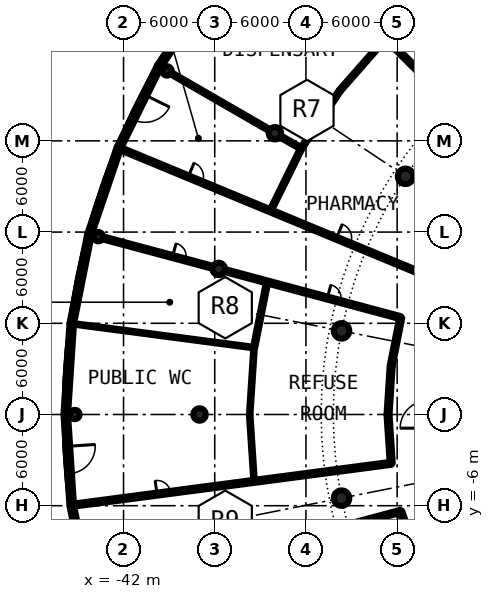
"""IFC4 building model, lengths in metres.
Left out: names, types, materials, properties, quantities, classifications, styles, units other than length and angle.
Written with IfcOpenShell. Run it as: python <this file> out.ifc"""

import sys

from ifc_helpers import new_model, si_unit, direction, frame, frame_2d, origin, origin_2d, place, context, subcontext, project, spatial, rectangle, hollow_circle, extrude, element, fill, save


model = new_model("IFC4")
c1 = context("Model", 3, precision=1e-05, world=origin(), true_north=direction((0.0, 1.0)))
c2 = subcontext(c1, "Body", "Model", "MODEL_VIEW")
j1 = project(units=[si_unit("LENGTHUNIT", "METRE"), si_unit("PLANEANGLEUNIT", "RADIAN")], contexts=[c1])
p1 = place(None, origin())
s1 = spatial("IfcSite", under=j1, at=p1, CompositionType="ELEMENT")
p2 = place(p1, origin())
s2 = spatial("IfcBuilding", under=s1, at=p2, CompositionType="ELEMENT")
p3 = place(p2, origin())
s3 = spatial("IfcBuildingStorey", under=s2, at=p3, CompositionType="ELEMENT", Elevation=0.0)
for number, where, z_axis, x_axis in (
    (1, (-23.448, 15.667, -0.5), (0.0, 0.0, 1.0), (1.0, 0.0, 0.0)),
    (2, (-27.658, 5.501, -0.5), (0.0, 0.0, 1.0), (1.0, 0.0, 0.0)),
    (3, (-27.658, -5.501, -0.5), (0.0, 0.0, 1.0), (1.0, 0.0, 0.0)),
):
    element("IfcColumn", number, at=place(p3, frame(where, z_axis=z_axis, x_axis=x_axis)), inside=s3, PredefinedType="COLUMN", context=c2, shape_type="SweptSolid", body=[
        extrude(hollow_circle(Radius=0.508, WallThickness=0.05, at=origin_2d()), origin(), (0.0, 0.0, 1.0), 5.9),
    ])
for number, where, z_axis, x_axis in (
    (4, (-32.043, 18.5, -0.5), (0.0, 0.0, 1.0), (1.0, 0.0, 0.0)),
    (5, (-35.739, 9.576, -0.5), (0.0, 0.0, 1.0), (1.0, 0.0, 0.0)),
    (6, (-37.0, 0.0, -0.5), (0.0, 0.0, 1.0), (1.0, 0.0, 0.0)),
):
    element("IfcColumn", number, at=place(p3, frame(where, z_axis=z_axis, x_axis=x_axis)), inside=s3, PredefinedType="COLUMN", context=c2, shape_type="SweptSolid", body=[
        extrude(hollow_circle(Radius=0.406, WallThickness=0.03, at=origin_2d()), origin(), (0.0, 0.0, 1.0), 5.9),
    ])
for number, where, z_axis, x_axis in (
    (7, (-39.144, 22.6, -0.5), (0.0, 0.0, 1.0), (1.0, 0.0, 0.0)),
    (8, (-43.66, 11.698, -0.5), (0.0, 0.0, 1.0), (1.0, 0.0, 0.0)),
    (9, (-45.2, 0.0, -0.5), (0.0, 0.0, 1.0), (1.0, 0.0, 0.0)),
):
    element("IfcColumn", number, at=place(p3, frame(where, z_axis=z_axis, x_axis=x_axis)), inside=s3, PredefinedType="COLUMN", context=c2, shape_type="SweptSolid", body=[
        extrude(hollow_circle(Radius=0.305, WallThickness=0.025, at=origin_2d()), origin(), (0.0, 0.0, 1.0), 5.9),
    ])
p4 = place(p3, frame((-36.336, 27.881, 0.0), z_axis=(0.0, 0.0, 1.0), x_axis=(-0.55554631985, -0.831485590074, 0.0)))
e10 = element("IfcWall", 10, at=p4, inside=s3, PredefinedType="SOLIDWALL", context=c2, shape_type="SweptSolid", body=[
    extrude(rectangle(XDim=5.991, YDim=0.3, at=frame_2d((2.995, 0.0))), origin(), (0.0, 0.0, 1.0), 4.95),
])
p5 = place(p4, frame((1.396, 0.0, 0.3)))
e11 = element("IfcOpeningElement", 11, at=p5, cuts=e10, PredefinedType="OPENING", context=c2, shape_type="SweptSolid", body=[
    extrude(rectangle(XDim=3.2, YDim=3.6, at=frame_2d((1.6, 1.8))), frame((0.0, 0.16, 0.0), z_axis=(0.0, -1.0, 0.0), x_axis=(1.0, 0.0, 0.0)), (0.0, 0.0, 1.0), 0.32),
])
p6 = place(p3, frame((-39.664, 22.9, 0.0), z_axis=(0.0, 0.0, 1.0), x_axis=(-0.44233289833, -0.896850939151, 0.0)))
e12 = element("IfcWall", 12, at=p6, inside=s3, PredefinedType="SOLIDWALL", context=c2, shape_type="SweptSolid", body=[
    extrude(rectangle(XDim=5.991, YDim=0.3, at=frame_2d((2.995, 0.0))), origin(), (0.0, 0.0, 1.0), 4.95),
])
p7 = place(p6, frame((2.095, 0.0, 0.0)))
e13 = element("IfcOpeningElement", 13, at=p7, cuts=e12, PredefinedType="OPENING", context=c2, shape_type="SweptSolid", body=[
    extrude(rectangle(XDim=1.8, YDim=2.2, at=frame_2d((0.9, 1.1))), frame((0.0, 0.16, 0.0), z_axis=(0.0, -1.0, 0.0), x_axis=(1.0, 0.0, 0.0)), (0.0, 0.0, 1.0), 0.32),
])
p8 = place(p3, frame((-42.314, 17.527, 0.0), z_axis=(0.0, 0.0, 1.0), x_axis=(-0.321333542675, -0.946966078776, 0.0)))
e14 = element("IfcWall", 14, at=p8, inside=s3, PredefinedType="SOLIDWALL", context=c2, shape_type="SweptSolid", body=[
    extrude(rectangle(XDim=5.991, YDim=0.3, at=frame_2d((2.995, 0.0))), origin(), (0.0, 0.0, 1.0), 4.95),
])
p9 = place(p8, frame((1.396, 0.0, 0.3)))
e15 = element("IfcOpeningElement", 15, at=p9, cuts=e14, PredefinedType="OPENING", context=c2, shape_type="SweptSolid", body=[
    extrude(rectangle(XDim=3.2, YDim=3.6, at=frame_2d((1.6, 1.8))), frame((0.0, 0.16, 0.0), z_axis=(0.0, -1.0, 0.0), x_axis=(1.0, 0.0, 0.0)), (0.0, 0.0, 1.0), 0.32),
])
p10 = place(p3, frame((-44.239, 11.854, 0.0), z_axis=(0.0, 0.0, 1.0), x_axis=(-0.195112945602, -0.980780780021, 0.0)))
e16 = element("IfcWall", 16, at=p10, inside=s3, PredefinedType="SOLIDWALL", context=c2, shape_type="SweptSolid", body=[
    extrude(rectangle(XDim=5.991, YDim=0.3, at=frame_2d((2.996, 0.0))), origin(), (0.0, 0.0, 1.0), 4.95),
])
p11 = place(p10, frame((1.396, 0.0, 0.3)))
e17 = element("IfcOpeningElement", 17, at=p11, cuts=e16, PredefinedType="OPENING", context=c2, shape_type="SweptSolid", body=[
    extrude(rectangle(XDim=3.2, YDim=3.6, at=frame_2d((1.6, 1.8))), frame((0.0, 0.16, 0.0), z_axis=(0.0, -1.0, 0.0), x_axis=(1.0, 0.0, 0.0)), (0.0, 0.0, 1.0), 0.32),
])
p12 = place(p3, frame((-45.408, 5.978, 0.0), z_axis=(0.0, 0.0, 1.0), x_axis=(-0.065447877106, -0.9978559893, 0.0)))
e18 = element("IfcWall", 18, at=p12, inside=s3, PredefinedType="SOLIDWALL", context=c2, shape_type="SweptSolid", body=[
    extrude(rectangle(XDim=5.991, YDim=0.3, at=frame_2d((2.996, 0.0))), origin(), (0.0, 0.0, 1.0), 4.95),
])
p13 = place(p12, frame((1.396, 0.0, 0.3)))
e19 = element("IfcOpeningElement", 19, at=p13, cuts=e18, PredefinedType="OPENING", context=c2, shape_type="SweptSolid", body=[
    extrude(rectangle(XDim=3.2, YDim=3.6, at=frame_2d((1.6, 1.8))), frame((0.0, 0.16, 0.0), z_axis=(0.0, -1.0, 0.0), x_axis=(1.0, 0.0, 0.0)), (0.0, 0.0, 1.0), 0.32),
])
p14 = place(p3, frame((-45.8, 0.0, 0.0), z_axis=(0.0, 0.0, 1.0), x_axis=(0.065447877106, -0.9978559893, 0.0)))
e20 = element("IfcWall", 20, at=p14, inside=s3, PredefinedType="SOLIDWALL", context=c2, shape_type="SweptSolid", body=[
    extrude(rectangle(XDim=5.991, YDim=0.3, at=frame_2d((2.996, 0.0))), origin(), (0.0, 0.0, 1.0), 4.95),
])
p15 = place(p14, frame((2.095, 0.0, 0.0)))
e21 = element("IfcOpeningElement", 21, at=p15, cuts=e20, PredefinedType="OPENING", context=c2, shape_type="SweptSolid", body=[
    extrude(rectangle(XDim=1.8, YDim=2.2, at=frame_2d((0.9, 1.1))), frame((0.0, 0.16, 0.0), z_axis=(0.0, -1.0, 0.0), x_axis=(1.0, 0.0, 0.0)), (0.0, 0.0, 1.0), 0.32),
])
p16 = place(p3, frame((-45.408, -5.978, 0.0), z_axis=(0.0, 0.0, 1.0), x_axis=(0.195112945602, -0.980780780021, 0.0)))
e22 = element("IfcWall", 22, at=p16, inside=s3, PredefinedType="SOLIDWALL", context=c2, shape_type="SweptSolid", body=[
    extrude(rectangle(XDim=5.991, YDim=0.3, at=frame_2d((2.996, 0.0))), origin(), (0.0, 0.0, 1.0), 4.95),
])
p17 = place(p16, frame((1.396, 0.0, 0.3)))
e23 = element("IfcOpeningElement", 23, at=p17, cuts=e22, PredefinedType="OPENING", context=c2, shape_type="SweptSolid", body=[
    extrude(rectangle(XDim=3.2, YDim=3.6, at=frame_2d((1.6, 1.8))), frame((0.0, 0.16, 0.0), z_axis=(0.0, -1.0, 0.0), x_axis=(1.0, 0.0, 0.0)), (0.0, 0.0, 1.0), 0.32),
])
p18 = place(p3, frame((-33.7, 0.0, 0.0), z_axis=(0.0, 0.0, 1.0), x_axis=(0.065294928673, -0.997866009186, 0.0)))
e24 = element("IfcWall", 24, at=p18, inside=s3, PredefinedType="PARTITIONING", context=c2, shape_type="SweptSolid", body=[
    extrude(rectangle(XDim=4.408, YDim=0.1, at=frame_2d((2.204, 0.0))), origin(), (0.0, 0.0, 1.0), 4.95),
])
p19 = place(p3, frame((-24.6, 0.0, 0.0), z_axis=(0.0, 0.0, 1.0), x_axis=(0.06532549509, -0.997864008616, 0.0)))
e25 = element("IfcWall", 25, at=p19, inside=s3, PredefinedType="PARTITIONING", context=c2, shape_type="SweptSolid", body=[
    extrude(rectangle(XDim=3.218, YDim=0.2, at=frame_2d((1.609, 0.0))), origin(), (0.0, 0.0, 1.0), 4.95),
])
p20 = place(p3, frame((-23.762, -6.367, 0.0), z_axis=(0.0, 0.0, 1.0), x_axis=(0.321593976879, -0.946877665823, 0.0)))
e26 = element("IfcWall", 26, at=p20, inside=s3, PredefinedType="PARTITIONING", context=c2, shape_type="SweptSolid", body=[
    extrude(rectangle(XDim=3.218, YDim=0.2, at=frame_2d((1.609, 0.0))), origin(), (0.0, 0.0, 1.0), 4.95),
])
p21 = place(p3, frame((-45.297, -5.963, 0.0), z_axis=(0.0, 0.0, 1.0), x_axis=(0.991454137917, 0.13045571052, 0.0)))
e27 = element("IfcWall", 27, at=p21, inside=s3, PredefinedType="PARTITIONING", context=c2, shape_type="SweptSolid", body=[
    extrude(rectangle(XDim=21.087, YDim=0.2, at=frame_2d((10.544, 0.0))), origin(), (0.0, 0.0, 1.0), 4.95),
])
p22 = place(p21, frame((5.544, 0.0, 0.0)))
e28 = element("IfcOpeningElement", 28, at=p22, cuts=e27, PredefinedType="OPENING", context=c2, shape_type="SweptSolid", body=[
    extrude(rectangle(XDim=0.9, YDim=2.3, at=frame_2d((0.45, 1.15))), frame((0.0, 0.11, 0.0), z_axis=(0.0, -1.0, 0.0), x_axis=(1.0, 0.0, 0.0)), (0.0, 0.0, 1.0), 0.22),
])
p23 = place(p3, frame((-45.297, 5.963, 0.0), z_axis=(0.0, 0.0, 1.0), x_axis=(0.991452701101, -0.130466629758, 0.0)))
e29 = element("IfcWall", 29, at=p23, inside=s3, PredefinedType="PARTITIONING", context=c2, shape_type="SweptSolid", body=[
    extrude(rectangle(XDim=11.988, YDim=0.1, at=frame_2d((5.994, 0.0))), origin(), (0.0, 0.0, 1.0), 4.95),
])
p24 = place(p3, frame((-43.37, 11.62, 0.0), z_axis=(0.0, 0.0, 1.0), x_axis=(0.965931198614, -0.25879899448, 0.0)))
e30 = element("IfcWall", 30, at=p24, inside=s3, PredefinedType="PARTITIONING", context=c2, shape_type="SweptSolid", body=[
    extrude(rectangle(XDim=7.501, YDim=0.2, at=frame_2d((3.75, 0.0))), origin(), (0.0, 0.0, 1.0), 4.95),
])
p25 = place(p24, frame((4.756, 0.0, 0.0)))
e31 = element("IfcOpeningElement", 31, at=p25, cuts=e30, PredefinedType="OPENING", context=c2, shape_type="SweptSolid", body=[
    extrude(rectangle(XDim=0.9, YDim=2.3, at=frame_2d((0.45, 1.15))), frame((0.0, 0.11, 0.0), z_axis=(0.0, -1.0, 0.0), x_axis=(1.0, 0.0, 0.0)), (0.0, 0.0, 1.0), 0.22),
])
p26 = place(p3, frame((-42.221, 17.489, 0.0), z_axis=(0.0, 0.0, 1.0), x_axis=(0.923857892323, -0.382735672225, 0.0)))
e32 = element("IfcWall", 32, at=p26, inside=s3, PredefinedType="PARTITIONING", context=c2, shape_type="SweptSolid", body=[
    extrude(rectangle(XDim=21.101, YDim=0.2, at=frame_2d((10.55, 0.0))), origin(), (0.0, 0.0, 1.0), 4.95),
])
p27 = place(p26, frame((15.4, 0.0, 0.0)))
e33 = element("IfcOpeningElement", 33, at=p27, cuts=e32, PredefinedType="OPENING", context=c2, shape_type="SweptSolid", body=[
    extrude(rectangle(XDim=1.0, YDim=2.3, at=frame_2d((0.5, 1.15))), frame((0.0, 0.11, 0.0), z_axis=(0.0, -1.0, 0.0), x_axis=(1.0, 0.0, 0.0)), (0.0, 0.0, 1.0), 0.22),
])
p28 = place(p26, frame((4.85, 0.0, 0.0)))
e34 = element("IfcOpeningElement", 34, at=p28, cuts=e32, PredefinedType="OPENING", context=c2, shape_type="SweptSolid", body=[
    extrude(rectangle(XDim=1.0, YDim=2.3, at=frame_2d((0.5, 1.15))), frame((0.0, 0.11, 0.0), z_axis=(0.0, -1.0, 0.0), x_axis=(1.0, 0.0, 0.0)), (0.0, 0.0, 1.0), 0.22),
])
p29 = place(p3, frame((-38.885, 22.45, 0.0), z_axis=(0.0, 0.0, 1.0), x_axis=(0.866055506462, -0.499947857008, 0.0)))
e35 = element("IfcWall", 35, at=p29, inside=s3, PredefinedType="PARTITIONING", context=c2, shape_type="SweptSolid", body=[
    extrude(rectangle(XDim=7.501, YDim=0.15, at=frame_2d((3.75, 0.0))), origin(), (0.0, 0.0, 1.0), 4.95),
])
p30 = place(p3, frame((-35.354, 9.472, 0.0), z_axis=(0.0, 0.0, 1.0), x_axis=(0.965928346829, -0.258809638136, 0.0)))
e36 = element("IfcWall", 36, at=p30, inside=s3, PredefinedType="PARTITIONING", context=c2, shape_type="SweptSolid", body=[
    extrude(rectangle(XDim=12.001, YDim=0.2, at=frame_2d((6.0, 0.0))), origin(), (0.0, 0.0, 1.0), 4.95),
])
p31 = place(p30, frame((7.001, 0.0, 0.0)))
e37 = element("IfcOpeningElement", 37, at=p31, cuts=e36, PredefinedType="OPENING", context=c2, shape_type="SweptSolid", body=[
    extrude(rectangle(XDim=0.9, YDim=2.3, at=frame_2d((0.45, 1.15))), frame((0.0, 0.11, 0.0), z_axis=(0.0, -1.0, 0.0), x_axis=(1.0, 0.0, 0.0)), (0.0, 0.0, 1.0), 0.22),
])
p32 = place(p3, frame((-35.353, -9.472, 0.0), z_axis=(0.0, 0.0, 1.0), x_axis=(0.965943238878, 0.258754051689, 0.0)))
e38 = element("IfcWall", 38, at=p32, inside=s3, PredefinedType="PARTITIONING", context=c2, shape_type="SweptSolid", body=[
    extrude(rectangle(XDim=12.0, YDim=0.2, at=frame_2d((6.0, 0.0))), origin(), (0.0, 0.0, 1.0), 4.95),
])
p33 = place(p3, frame((-31.697, 18.3, 0.0), z_axis=(0.0, 0.0, 1.0), x_axis=(0.866066190972, -0.499929347863, 0.0)))
e39 = element("IfcWall", 39, at=p33, inside=s3, PredefinedType="PARTITIONING", context=c2, shape_type="SweptSolid", body=[
    extrude(rectangle(XDim=1.6, YDim=0.15, at=frame_2d((0.8, 0.0))), origin(), (0.0, 0.0, 1.0), 4.95),
])
p34 = place(p3, frame((-27.813, 36.247, 0.0), z_axis=(0.0, 0.0, 1.0), x_axis=(0.608725588574, -0.793380840338, 0.0)))
e40 = element("IfcWall", 40, at=p34, inside=s3, PredefinedType="PARTITIONING", context=c2, shape_type="SweptSolid", body=[
    extrude(rectangle(XDim=21.088, YDim=0.2, at=frame_2d((10.544, 0.0))), origin(), (0.0, 0.0, 1.0), 4.95),
])
p35 = place(p34, frame((16.738, 0.0, 0.0)))
e41 = element("IfcOpeningElement", 41, at=p35, cuts=e40, PredefinedType="OPENING", context=c2, shape_type="SweptSolid", body=[
    extrude(rectangle(XDim=1.0, YDim=2.3, at=frame_2d((0.5, 1.15))), frame((0.0, 0.11, 0.0), z_axis=(0.0, -1.0, 0.0), x_axis=(1.0, 0.0, 0.0)), (0.0, 0.0, 1.0), 0.22),
])
p36 = place(p34, frame((6.194, 0.0, 0.0)))
e42 = element("IfcOpeningElement", 42, at=p36, cuts=e40, PredefinedType="OPENING", context=c2, shape_type="SweptSolid", body=[
    extrude(rectangle(XDim=1.0, YDim=2.3, at=frame_2d((0.5, 1.15))), frame((0.0, 0.11, 0.0), z_axis=(0.0, -1.0, 0.0), x_axis=(1.0, 0.0, 0.0)), (0.0, 0.0, 1.0), 0.22),
])
p37 = place(p3, frame((-25.876, 25.876, 0.0), z_axis=(0.0, 0.0, 1.0), x_axis=(0.707106781187, -0.707106781187, 0.0)))
e43 = element("IfcWall", 43, at=p37, inside=s3, PredefinedType="PARTITIONING", context=c2, shape_type="SweptSolid", body=[
    extrude(rectangle(XDim=11.994, YDim=0.2, at=frame_2d((5.997, 0.0))), origin(), (0.0, 0.0, 1.0), 4.95),
])
for number, where, z_axis, x_axis in (
    (44, (-24.6, 0.0, 0.0), (0.0, 0.0, 1.0), (0.065, 0.998, 0.0)),
    (45, (-24.39, 3.211, 0.0), (0.0, 0.0, 1.0), (0.195, 0.981, 0.0)),
):
    element("IfcWall", number, at=place(p3, frame(where, z_axis=z_axis, x_axis=x_axis)), inside=s3, PredefinedType="PARTITIONING", context=c2, shape_type="SweptSolid", body=[
        extrude(rectangle(XDim=3.218, YDim=0.2, at=frame_2d((1.609, 0.0))), origin(), (0.0, 0.0, 1.0), 4.95),
    ])
p38 = place(p3, frame((-33.7, 0.0, 0.0), z_axis=(0.0, 0.0, 1.0), x_axis=(0.065294928673, 0.997866009186, 0.0)))
e46 = element("IfcWall", 46, at=p38, inside=s3, PredefinedType="PARTITIONING", context=c2, shape_type="SweptSolid", body=[
    extrude(rectangle(XDim=4.408, YDim=0.1, at=frame_2d((2.204, 0.0))), origin(), (0.0, 0.0, 1.0), 4.95),
])
p39 = place(p3, frame((-33.412, 4.399, 0.0), z_axis=(0.0, 0.0, 1.0), x_axis=(0.19513607482, 0.980776178495, 0.0)))
e47 = element("IfcWall", 47, at=p39, inside=s3, PredefinedType="PARTITIONING", context=c2, shape_type="SweptSolid", body=[
    extrude(rectangle(XDim=4.408, YDim=0.15, at=frame_2d((2.204, 0.0))), origin(), (0.0, 0.0, 1.0), 4.95),
])
p40 = place(p3, frame((-32.336, 13.394, 0.0), z_axis=(0.0, 0.0, 1.0), x_axis=(0.442300710668, 0.896866813603, 0.0)))
e48 = element("IfcWall", 48, at=p40, inside=s3, PredefinedType="PARTITIONING", context=c2, shape_type="SweptSolid", body=[
    extrude(rectangle(XDim=4.578, YDim=0.15, at=frame_2d((2.289, 0.0))), origin(), (0.0, 0.0, 1.0), 4.95),
])
p41 = place(p3, frame((-30.311, 17.5, 0.0), z_axis=(0.0, 0.0, 1.0), x_axis=(0.555610431873, 0.831442750882, 0.0)))
e49 = element("IfcWall", 49, at=p41, inside=s3, PredefinedType="PARTITIONING", context=c2, shape_type="SweptSolid", body=[
    extrude(rectangle(XDim=4.579, YDim=0.15, at=frame_2d((2.289, 0.0))), origin(), (0.0, 0.0, 1.0), 4.95),
])
p42 = place(p3, frame((-27.767, 21.307, 0.0), z_axis=(0.0, 0.0, 1.0), x_axis=(0.659270714245, 0.751905662526, 0.0)))
e50 = element("IfcWall", 50, at=p42, inside=s3, PredefinedType="PARTITIONING", context=c2, shape_type="SweptSolid", body=[
    extrude(rectangle(XDim=4.578, YDim=0.15, at=frame_2d((2.289, 0.0))), origin(), (0.0, 0.0, 1.0), 4.95),
])
p43 = place(p7, origin())
e51 = element("IfcDoor", 51, at=p43, inside=s3, OperationType="SINGLE_SWING_LEFT", PredefinedType="DOOR", context=c2, shape_type="SweptSolid", body=[
    extrude(rectangle(XDim=1.8, YDim=2.2, at=frame_2d((0.9, 1.1))), frame((0.0, 0.025, 0.0), z_axis=(0.0, -1.0, 0.0), x_axis=(1.0, 0.0, 0.0)), (0.0, 0.0, 1.0), 0.05),
])
fill(e13, e51)
p44 = place(p9, origin())
e52 = element("IfcWindow", 52, at=p44, inside=s3, PartitioningType="SINGLE_PANEL", PredefinedType="WINDOW", context=c2, shape_type="SweptSolid", body=[
    extrude(rectangle(XDim=3.2, YDim=3.6, at=frame_2d((1.6, 1.8))), frame((0.0, 0.03, 0.0), z_axis=(0.0, -1.0, 0.0), x_axis=(1.0, 0.0, 0.0)), (0.0, 0.0, 1.0), 0.06),
])
fill(e15, e52)
p45 = place(p11, origin())
e53 = element("IfcWindow", 53, at=p45, inside=s3, PartitioningType="SINGLE_PANEL", PredefinedType="WINDOW", context=c2, shape_type="SweptSolid", body=[
    extrude(rectangle(XDim=3.2, YDim=3.6, at=frame_2d((1.6, 1.8))), frame((0.0, 0.03, 0.0), z_axis=(0.0, -1.0, 0.0), x_axis=(1.0, 0.0, 0.0)), (0.0, 0.0, 1.0), 0.06),
])
fill(e17, e53)
p46 = place(p13, origin())
e54 = element("IfcWindow", 54, at=p46, inside=s3, PartitioningType="SINGLE_PANEL", PredefinedType="WINDOW", context=c2, shape_type="SweptSolid", body=[
    extrude(rectangle(XDim=3.2, YDim=3.6, at=frame_2d((1.6, 1.8))), frame((0.0, 0.03, 0.0), z_axis=(0.0, -1.0, 0.0), x_axis=(1.0, 0.0, 0.0)), (0.0, 0.0, 1.0), 0.06),
])
fill(e19, e54)
p47 = place(p15, origin())
e55 = element("IfcDoor", 55, at=p47, inside=s3, OperationType="SINGLE_SWING_LEFT", PredefinedType="DOOR", context=c2, shape_type="SweptSolid", body=[
    extrude(rectangle(XDim=1.8, YDim=2.2, at=frame_2d((0.9, 1.1))), frame((0.0, 0.025, 0.0), z_axis=(0.0, -1.0, 0.0), x_axis=(1.0, 0.0, 0.0)), (0.0, 0.0, 1.0), 0.05),
])
fill(e21, e55)
p48 = place(p27, origin())
e56 = element("IfcDoor", 56, at=p48, inside=s3, OperationType="SINGLE_SWING_RIGHT", PredefinedType="DOOR", context=c2, shape_type="SweptSolid", body=[
    extrude(rectangle(XDim=1.0, YDim=2.3, at=frame_2d((0.5, 1.15))), frame((0.0, 0.025, 0.0), z_axis=(0.0, -1.0, 0.0), x_axis=(1.0, 0.0, 0.0)), (0.0, 0.0, 1.0), 0.05),
])
fill(e33, e56)
p49 = place(p28, origin())
e57 = element("IfcDoor", 57, at=p49, inside=s3, OperationType="SINGLE_SWING_LEFT", PredefinedType="DOOR", context=c2, shape_type="SweptSolid", body=[
    extrude(rectangle(XDim=1.0, YDim=2.3, at=frame_2d((0.5, 1.15))), frame((0.0, 0.025, 0.0), z_axis=(0.0, -1.0, 0.0), x_axis=(1.0, 0.0, 0.0)), (0.0, 0.0, 1.0), 0.05),
])
fill(e34, e57)
p50 = place(p31, origin())
e58 = element("IfcDoor", 58, at=p50, inside=s3, OperationType="SINGLE_SWING_RIGHT", PredefinedType="DOOR", context=c2, shape_type="SweptSolid", body=[
    extrude(rectangle(XDim=0.9, YDim=2.3, at=frame_2d((0.45, 1.15))), frame((0.0, 0.025, 0.0), z_axis=(0.0, -1.0, 0.0), x_axis=(1.0, 0.0, 0.0)), (0.0, 0.0, 1.0), 0.05),
])
fill(e37, e58)
p51 = place(p25, origin())
e59 = element("IfcDoor", 59, at=p51, inside=s3, OperationType="SINGLE_SWING_RIGHT", PredefinedType="DOOR", context=c2, shape_type="SweptSolid", body=[
    extrude(rectangle(XDim=0.9, YDim=2.3, at=frame_2d((0.45, 1.15))), frame((0.0, 0.025, 0.0), z_axis=(0.0, -1.0, 0.0), x_axis=(1.0, 0.0, 0.0)), (0.0, 0.0, 1.0), 0.05),
])
fill(e31, e59)
p52 = place(p22, origin())
e60 = element("IfcDoor", 60, at=p52, inside=s3, OperationType="SINGLE_SWING_LEFT", PredefinedType="DOOR", context=c2, shape_type="SweptSolid", body=[
    extrude(rectangle(XDim=0.9, YDim=2.3, at=frame_2d((0.45, 1.15))), frame((0.0, 0.025, 0.0), z_axis=(0.0, -1.0, 0.0), x_axis=(1.0, 0.0, 0.0)), (0.0, 0.0, 1.0), 0.05),
])
fill(e28, e60)
save(model, sys.argv[1])
